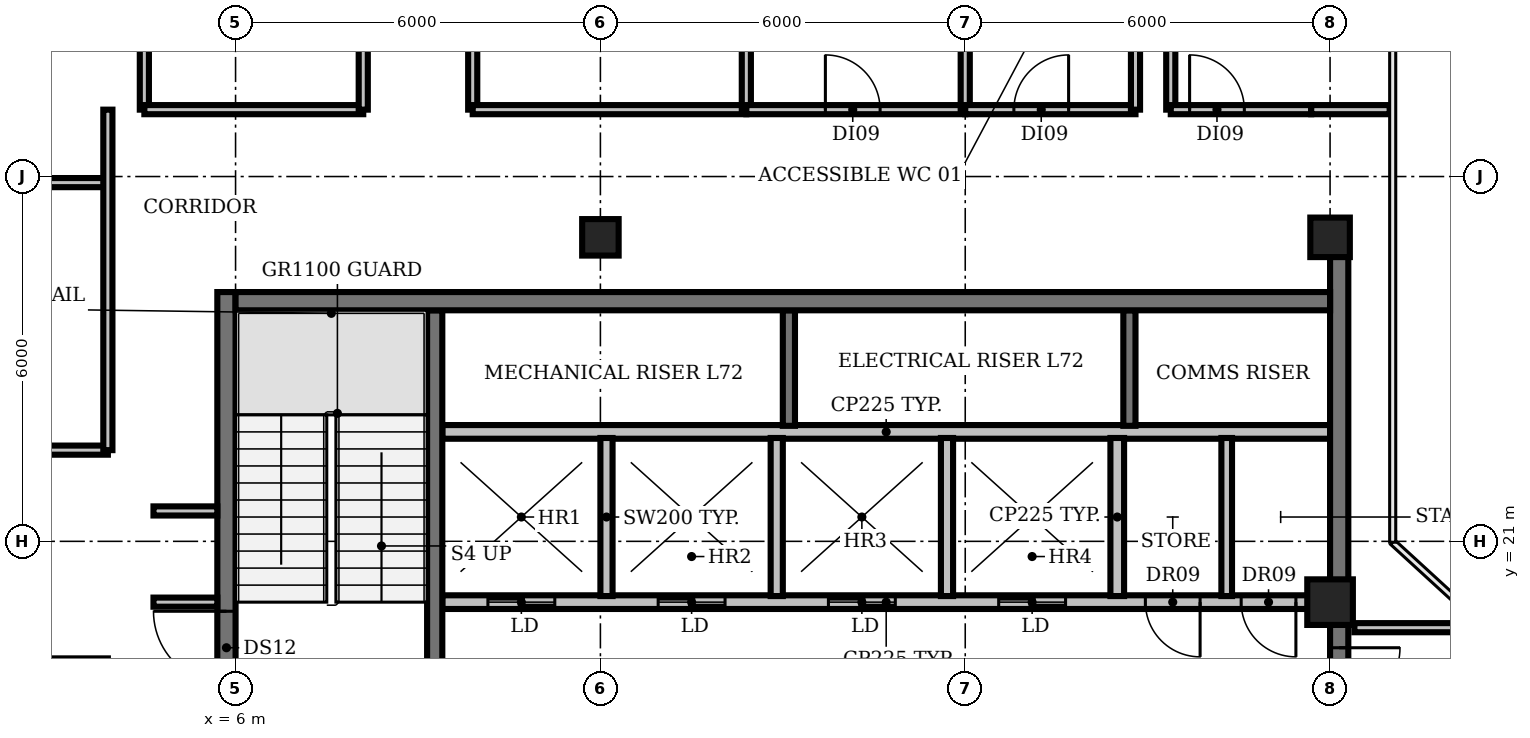
"""IFC4 building model, lengths in metres.
Left out: names, types, materials, properties, quantities, classifications, styles, units other than length and angle.
Written with IfcOpenShell. Run it as: python <this file> out.ifc"""

import sys

from ifc_helpers import new_model, si_unit, direction, frame, frame_2d, origin, origin_2d, place, context, subcontext, project, spatial, rectangle, circle, extrude, element, fill, save


model = new_model("IFC4")
c1 = context("Model", 3, precision=1e-05, world=origin(), true_north=direction((0.0, 1.0)))
c2 = subcontext(c1, "Body", "Model", "MODEL_VIEW")
j1 = project(units=[si_unit("LENGTHUNIT", "METRE"), si_unit("PLANEANGLEUNIT", "RADIAN")], contexts=[c1])
p1 = place(None, origin())
s1 = spatial("IfcSite", under=j1, at=p1, CompositionType="ELEMENT")
p2 = place(p1, origin())
s2 = spatial("IfcBuilding", under=s1, at=p2, CompositionType="ELEMENT")
p3 = place(p2, frame((0.0, 0.0, 323.0)))
s3 = spatial("IfcBuildingStorey", under=s2, at=p3, CompositionType="ELEMENT", Elevation=323.0)
p4 = place(p3, frame((12.0, 26.0, 0.0), z_axis=(0.0, 0.0, 1.0), x_axis=(1.0, 0.0, 0.0)))
e1 = element("IfcColumn", 1, at=p4, inside=s3, PredefinedType="COLUMN", context=c2, shape_type="SweptSolid", body=[
    extrude(rectangle(XDim=0.6, YDim=0.6, at=origin_2d()), origin(), (0.0, 0.0, 1.0), 3.9),
])
p5 = place(p3, frame((24.0, 20.0, 0.0), z_axis=(0.0, 0.0, 1.0), x_axis=(1.0, 0.0, 0.0)))
e2 = element("IfcColumn", 2, at=p5, inside=s3, PredefinedType="COLUMN", context=c2, shape_type="SweptSolid", body=[
    extrude(circle(Radius=0.375, at=origin_2d()), origin(), (0.0, 0.0, 1.0), 3.9),
])
p6 = place(p3, frame((24.0, 26.0, 0.0), z_axis=(0.0, 0.0, 1.0), x_axis=(1.0, 0.0, 0.0)))
e3 = element("IfcColumn", 3, at=p6, inside=s3, PredefinedType="COLUMN", context=c2, shape_type="SweptSolid", body=[
    extrude(rectangle(XDim=0.65, YDim=0.65, at=origin_2d()), origin(), (0.0, 0.0, 1.0), 3.9),
])
p7 = place(p3, frame((24.0, 20.0, 0.0), z_axis=(0.0, 0.0, 1.0), x_axis=(-1.0, 0.0, 0.0)))
e4 = element("IfcWall", 4, at=p7, inside=s3, PredefinedType="PARTITIONING", context=c2, shape_type="SweptSolid", body=[
    extrude(rectangle(XDim=14.6, YDim=0.225, at=frame_2d((7.3, 0.0))), origin(), (0.0, 0.0, 1.0), 3.9),
])
p8 = place(p7, frame((12.75, 0.0, 0.0)))
e5 = element("IfcOpeningElement", 5, at=p8, cuts=e4, PredefinedType="OPENING", context=c2, shape_type="SweptSolid", body=[
    extrude(rectangle(XDim=1.1, YDim=2.1, at=frame_2d((0.55, 1.05))), frame((0.0, 0.123, 0.0), z_axis=(0.0, -1.0, 0.0), x_axis=(1.0, 0.0, 0.0)), (0.0, 0.0, 1.0), 0.245),
])
p9 = place(p7, frame((9.95, 0.0, 0.0)))
e6 = element("IfcOpeningElement", 6, at=p9, cuts=e4, PredefinedType="OPENING", context=c2, shape_type="SweptSolid", body=[
    extrude(rectangle(XDim=1.1, YDim=2.1, at=frame_2d((0.55, 1.05))), frame((0.0, 0.123, 0.0), z_axis=(0.0, -1.0, 0.0), x_axis=(1.0, 0.0, 0.0)), (0.0, 0.0, 1.0), 0.245),
])
p10 = place(p7, frame((7.15, 0.0, 0.0)))
e7 = element("IfcOpeningElement", 7, at=p10, cuts=e4, PredefinedType="OPENING", context=c2, shape_type="SweptSolid", body=[
    extrude(rectangle(XDim=1.1, YDim=2.1, at=frame_2d((0.55, 1.05))), frame((0.0, 0.123, 0.0), z_axis=(0.0, -1.0, 0.0), x_axis=(1.0, 0.0, 0.0)), (0.0, 0.0, 1.0), 0.245),
])
p11 = place(p7, frame((4.35, 0.0, 0.0)))
e8 = element("IfcOpeningElement", 8, at=p11, cuts=e4, PredefinedType="OPENING", context=c2, shape_type="SweptSolid", body=[
    extrude(rectangle(XDim=1.1, YDim=2.1, at=frame_2d((0.55, 1.05))), frame((0.0, 0.123, 0.0), z_axis=(0.0, -1.0, 0.0), x_axis=(1.0, 0.0, 0.0)), (0.0, 0.0, 1.0), 0.245),
])
p12 = place(p7, frame((2.137, 0.0, 0.0)))
e9 = element("IfcOpeningElement", 9, at=p12, cuts=e4, PredefinedType="OPENING", context=c2, shape_type="SweptSolid", body=[
    extrude(rectangle(XDim=0.9, YDim=2.1, at=frame_2d((0.45, 1.05))), frame((0.0, 0.123, 0.0), z_axis=(0.0, -1.0, 0.0), x_axis=(1.0, 0.0, 0.0)), (0.0, 0.0, 1.0), 0.245),
])
p13 = place(p7, frame((0.562, 0.0, 0.0)))
e10 = element("IfcOpeningElement", 10, at=p13, cuts=e4, PredefinedType="OPENING", context=c2, shape_type="SweptSolid", body=[
    extrude(rectangle(XDim=0.9, YDim=2.1, at=frame_2d((0.45, 1.05))), frame((0.0, 0.123, 0.0), z_axis=(0.0, -1.0, 0.0), x_axis=(1.0, 0.0, 0.0)), (0.0, 0.0, 1.0), 0.245),
])
p14 = place(p3, frame((9.4, 22.8, 0.0), z_axis=(0.0, 0.0, 1.0), x_axis=(1.0, 0.0, 0.0)))
e11 = element("IfcWall", 11, at=p14, inside=s3, PredefinedType="PARTITIONING", context=c2, shape_type="SweptSolid", body=[
    extrude(rectangle(XDim=14.6, YDim=0.225, at=frame_2d((7.3, 0.0))), origin(), (0.0, 0.0, 1.0), 3.9),
])
p15 = place(p3, frame((9.275, 18.375, 0.0), z_axis=(0.0, 0.0, 1.0), x_axis=(0.0, 1.0, 0.0)))
e12 = element("IfcWall", 12, at=p15, inside=s3, PredefinedType="SHEAR", context=c2, shape_type="SweptSolid", body=[
    extrude(rectangle(XDim=6.425, YDim=0.25, at=frame_2d((3.212, 0.0))), origin(), (0.0, 0.0, 1.0), 3.9),
])
for number, where, z_axis, x_axis in (
    (13, (12.1, 20.1, 0.0), (0.0, 0.0, 1.0), (0.0, 1.0, 0.0)),
    (14, (14.9, 20.1, 0.0), (0.0, 0.0, 1.0), (0.0, 1.0, 0.0)),
):
    element("IfcWall", number, at=place(p3, frame(where, z_axis=z_axis, x_axis=x_axis)), inside=s3, PredefinedType="SOLIDWALL", context=c2, shape_type="SweptSolid", body=[
        extrude(rectangle(XDim=2.6, YDim=0.2, at=frame_2d((1.3, 0.0))), origin(), (0.0, 0.0, 1.0), 3.9),
    ])
p16 = place(p3, frame((15.1, 22.9, 0.0), z_axis=(0.0, 0.0, 1.0), x_axis=(0.0, 1.0, 0.0)))
e15 = element("IfcWall", 15, at=p16, inside=s3, PredefinedType="SHEAR", context=c2, shape_type="SweptSolid", body=[
    extrude(rectangle(XDim=1.9, YDim=0.2, at=frame_2d((0.95, 0.0))), origin(), (0.0, 0.0, 1.0), 3.9),
])
p17 = place(p3, frame((17.7, 20.1, 0.0), z_axis=(0.0, 0.0, 1.0), x_axis=(0.0, 1.0, 0.0)))
e16 = element("IfcWall", 16, at=p17, inside=s3, PredefinedType="SOLIDWALL", context=c2, shape_type="SweptSolid", body=[
    extrude(rectangle(XDim=2.6, YDim=0.2, at=frame_2d((1.3, 0.0))), origin(), (0.0, 0.0, 1.0), 3.9),
])
p18 = place(p3, frame((20.5, 20.1, 0.0), z_axis=(0.0, 0.0, 1.0), x_axis=(0.0, 1.0, 0.0)))
e17 = element("IfcWall", 17, at=p18, inside=s3, PredefinedType="PARTITIONING", context=c2, shape_type="SweptSolid", body=[
    extrude(rectangle(XDim=2.6, YDim=0.225, at=frame_2d((1.3, 0.0))), origin(), (0.0, 0.0, 1.0), 3.9),
])
p19 = place(p3, frame((20.7, 22.9, 0.0), z_axis=(0.0, 0.0, 1.0), x_axis=(0.0, 1.0, 0.0)))
e18 = element("IfcWall", 18, at=p19, inside=s3, PredefinedType="SHEAR", context=c2, shape_type="SweptSolid", body=[
    extrude(rectangle(XDim=1.9, YDim=0.2, at=frame_2d((0.95, 0.0))), origin(), (0.0, 0.0, 1.0), 3.9),
])
p20 = place(p3, frame((22.3, 20.1, 0.0), z_axis=(0.0, 0.0, 1.0), x_axis=(0.0, 1.0, 0.0)))
e19 = element("IfcWall", 19, at=p20, inside=s3, PredefinedType="PARTITIONING", context=c2, shape_type="SweptSolid", body=[
    extrude(rectangle(XDim=2.6, YDim=0.175, at=frame_2d((1.3, 0.0))), origin(), (0.0, 0.0, 1.0), 3.9),
])
p21 = place(p3, frame((5.85, 5.1, 0.0), z_axis=(0.0, 0.0, 1.0), x_axis=(0.0, 1.0, 0.0)))
e20 = element("IfcWall", 20, at=p21, inside=s3, PredefinedType="SHEAR", context=c2, shape_type="SweptSolid", body=[
    extrude(rectangle(XDim=20.0, YDim=0.3, at=frame_2d((10.0, 0.0))), origin(), (0.0, 0.0, 1.0), 3.9),
])
p22 = place(p21, frame((0.55, 0.0, 0.0)))
e21 = element("IfcOpeningElement", 21, at=p22, cuts=e20, PredefinedType="OPENING", context=c2, shape_type="SweptSolid", body=[
    extrude(rectangle(XDim=1.5, YDim=2.1, at=frame_2d((0.75, 1.05))), frame((0.0, 0.16, 0.0), z_axis=(0.0, -1.0, 0.0), x_axis=(1.0, 0.0, 0.0)), (0.0, 0.0, 1.0), 0.32),
])
p23 = place(p21, frame((7.0, 0.0, 0.0)))
e22 = element("IfcOpeningElement", 22, at=p23, cuts=e20, PredefinedType="OPENING", context=c2, shape_type="SweptSolid", body=[
    extrude(rectangle(XDim=1.2, YDim=2.1, at=frame_2d((0.6, 1.05))), frame((0.0, 0.16, 0.0), z_axis=(0.0, -1.0, 0.0), x_axis=(1.0, 0.0, 0.0)), (0.0, 0.0, 1.0), 0.32),
])
p24 = place(p21, frame((13.55, 0.0, 0.0)))
e23 = element("IfcOpeningElement", 23, at=p24, cuts=e20, PredefinedType="OPENING", context=c2, shape_type="SweptSolid", body=[
    extrude(rectangle(XDim=1.2, YDim=2.1, at=frame_2d((0.6, 1.05))), frame((0.0, 0.16, 0.0), z_axis=(0.0, -1.0, 0.0), x_axis=(1.0, 0.0, 0.0)), (0.0, 0.0, 1.0), 0.32),
])
p25 = place(p3, frame((24.15, 25.705, 0.0), z_axis=(0.0, 0.0, 1.0), x_axis=(0.0, -1.0, 0.0)))
e24 = element("IfcWall", 24, at=p25, inside=s3, PredefinedType="SHEAR", context=c2, shape_type="SweptSolid", body=[
    extrude(rectangle(XDim=20.605, YDim=0.3, at=frame_2d((10.302, 0.0))), origin(), (0.0, 0.0, 1.0), 3.9),
])
p26 = place(p25, frame((18.555, 0.0, 0.0)))
e25 = element("IfcOpeningElement", 25, at=p26, cuts=e24, PredefinedType="OPENING", context=c2, shape_type="SweptSolid", body=[
    extrude(rectangle(XDim=1.5, YDim=2.1, at=frame_2d((0.75, 1.05))), frame((0.0, 0.16, 0.0), z_axis=(0.0, -1.0, 0.0), x_axis=(1.0, 0.0, 0.0)), (0.0, 0.0, 1.0), 0.32),
])
p27 = place(p25, frame((12.455, 0.0, 0.0)))
e26 = element("IfcOpeningElement", 26, at=p27, cuts=e24, PredefinedType="OPENING", context=c2, shape_type="SweptSolid", body=[
    extrude(rectangle(XDim=0.9, YDim=2.1, at=frame_2d((0.45, 1.05))), frame((0.0, 0.16, 0.0), z_axis=(0.0, -1.0, 0.0), x_axis=(1.0, 0.0, 0.0)), (0.0, 0.0, 1.0), 0.32),
])
p28 = place(p25, frame((6.455, 0.0, 0.0)))
e27 = element("IfcOpeningElement", 27, at=p28, cuts=e24, PredefinedType="OPENING", context=c2, shape_type="SweptSolid", body=[
    extrude(rectangle(XDim=2.0, YDim=2.1, at=frame_2d((1.0, 1.05))), frame((0.0, 0.16, 0.0), z_axis=(0.0, -1.0, 0.0), x_axis=(1.0, 0.0, 0.0)), (0.0, 0.0, 1.0), 0.32),
])
p29 = place(p3, frame((6.0, 24.95, 0.0), z_axis=(0.0, 0.0, 1.0), x_axis=(1.0, 0.0, 0.0)))
e28 = element("IfcWall", 28, at=p29, inside=s3, PredefinedType="SHEAR", context=c2, shape_type="SweptSolid", body=[
    extrude(rectangle(XDim=18.0, YDim=0.3, at=frame_2d((9.0, 0.0))), origin(), (0.0, 0.0, 1.0), 3.9),
])
p30 = place(p3, frame((-1.18, 26.9, 0.0), z_axis=(0.0, 0.0, 1.0), x_axis=(1.0, 0.0, 0.0)))
e29 = element("IfcWall", 29, at=p30, inside=s3, PredefinedType="PARTITIONING", context=c2, shape_type="SweptSolid", body=[
    extrude(rectangle(XDim=5.08, YDim=0.15, at=frame_2d((2.54, 0.0))), origin(), (0.0, 0.0, 1.0), 2.48),
])
p31 = place(p3, frame((2.79, 22.5, 0.0), z_axis=(0.0, 0.0, 1.0), x_axis=(1.0, 0.0, 0.0)))
e30 = element("IfcWall", 30, at=p31, inside=s3, PredefinedType="PARTITIONING", context=c2, shape_type="SweptSolid", body=[
    extrude(rectangle(XDim=1.11, YDim=0.15, at=frame_2d((0.555, 0.0))), origin(), (0.0, 0.0, 1.0), 2.48),
])
p32 = place(p3, frame((3.9, 22.5, 0.0), z_axis=(0.0, 0.0, 1.0), x_axis=(0.0, 1.0, 0.0)))
e31 = element("IfcWall", 31, at=p32, inside=s3, PredefinedType="PARTITIONING", context=c2, shape_type="SweptSolid", body=[
    extrude(rectangle(XDim=5.6, YDim=0.15, at=frame_2d((2.8, 0.0))), origin(), (0.0, 0.0, 1.0), 2.48),
])
p33 = place(p3, frame((4.5, 28.1, 0.0), z_axis=(0.0, 0.0, 1.0), x_axis=(0.0, 1.0, 0.0)))
e32 = element("IfcWall", 32, at=p33, inside=s3, PredefinedType="PARTITIONING", context=c2, shape_type="SweptSolid", body=[
    extrude(rectangle(XDim=4.8, YDim=0.15, at=frame_2d((2.4, 0.0))), origin(), (0.0, 0.0, 1.0), 2.48),
])
p34 = place(p3, frame((4.5, 28.1, 0.0), z_axis=(0.0, 0.0, 1.0), x_axis=(1.0, 0.0, 0.0)))
e33 = element("IfcWall", 33, at=p34, inside=s3, PredefinedType="PARTITIONING", context=c2, shape_type="SweptSolid", body=[
    extrude(rectangle(XDim=3.6, YDim=0.15, at=frame_2d((1.8, 0.0))), origin(), (0.0, 0.0, 1.0), 2.48),
])
for number, where, z_axis, x_axis in (
    (34, (4.65, 20.0, 0.0), (0.0, 0.0, 1.0), (1.0, 0.0, 0.0)),
    (35, (4.65, 21.5, 0.0), (0.0, 0.0, 1.0), (1.0, 0.0, 0.0)),
):
    element("IfcWall", number, at=place(p3, frame(where, z_axis=z_axis, x_axis=x_axis)), inside=s3, PredefinedType="PARTITIONING", context=c2, shape_type="SweptSolid", body=[
        extrude(rectangle(XDim=1.05, YDim=0.15, at=frame_2d((0.525, 0.0))), origin(), (0.0, 0.0, 1.0), 2.48),
    ])
p35 = place(p3, frame((8.1, 28.1, 0.0), z_axis=(0.0, 0.0, 1.0), x_axis=(0.0, 1.0, 0.0)))
e36 = element("IfcWall", 36, at=p35, inside=s3, PredefinedType="PARTITIONING", context=c2, shape_type="SweptSolid", body=[
    extrude(rectangle(XDim=4.8, YDim=0.15, at=frame_2d((2.4, 0.0))), origin(), (0.0, 0.0, 1.0), 2.48),
])
p36 = place(p35, frame((1.3, 0.0, 0.0)))
e37 = element("IfcOpeningElement", 37, at=p36, cuts=e36, PredefinedType="OPENING", context=c2, shape_type="SweptSolid", body=[
    extrude(rectangle(XDim=0.9, YDim=2.1, at=frame_2d((0.45, 1.05))), frame((0.0, 0.085, 0.0), z_axis=(0.0, -1.0, 0.0), x_axis=(1.0, 0.0, 0.0)), (0.0, 0.0, 1.0), 0.17),
])
p37 = place(p3, frame((9.9, 28.1, 0.0), z_axis=(0.0, 0.0, 1.0), x_axis=(0.0, 1.0, 0.0)))
e38 = element("IfcWall", 38, at=p37, inside=s3, PredefinedType="PARTITIONING", context=c2, shape_type="SweptSolid", body=[
    extrude(rectangle(XDim=4.8, YDim=0.15, at=frame_2d((2.4, 0.0))), origin(), (0.0, 0.0, 1.0), 2.48),
])
p38 = place(p3, frame((9.9, 28.1, 0.0), z_axis=(0.0, 0.0, 1.0), x_axis=(1.0, 0.0, 0.0)))
e39 = element("IfcWall", 39, at=p38, inside=s3, PredefinedType="PARTITIONING", context=c2, shape_type="SweptSolid", body=[
    extrude(rectangle(XDim=4.5, YDim=0.15, at=frame_2d((2.25, 0.0))), origin(), (0.0, 0.0, 1.0), 2.48),
])
p39 = place(p3, frame((14.4, 28.1, 0.0), z_axis=(0.0, 0.0, 1.0), x_axis=(0.0, 1.0, 0.0)))
e40 = element("IfcWall", 40, at=p39, inside=s3, PredefinedType="PARTITIONING", context=c2, shape_type="SweptSolid", body=[
    extrude(rectangle(XDim=4.8, YDim=0.15, at=frame_2d((2.4, 0.0))), origin(), (0.0, 0.0, 1.0), 2.48),
])
p40 = place(p3, frame((14.4, 28.1, 0.0), z_axis=(0.0, 0.0, 1.0), x_axis=(1.0, 0.0, 0.0)))
e41 = element("IfcWall", 41, at=p40, inside=s3, PredefinedType="PARTITIONING", context=c2, shape_type="SweptSolid", body=[
    extrude(rectangle(XDim=3.6, YDim=0.15, at=frame_2d((1.8, 0.0))), origin(), (0.0, 0.0, 1.0), 2.48),
])
p41 = place(p40, frame((1.3, 0.0, 0.0)))
e42 = element("IfcOpeningElement", 42, at=p41, cuts=e41, PredefinedType="OPENING", context=c2, shape_type="SweptSolid", body=[
    extrude(rectangle(XDim=0.9, YDim=2.1, at=frame_2d((0.45, 1.05))), frame((0.0, 0.085, 0.0), z_axis=(0.0, -1.0, 0.0), x_axis=(1.0, 0.0, 0.0)), (0.0, 0.0, 1.0), 0.17),
])
p42 = place(p3, frame((18.0, 28.1, 0.0), z_axis=(0.0, 0.0, 1.0), x_axis=(0.0, 1.0, 0.0)))
e43 = element("IfcWall", 43, at=p42, inside=s3, PredefinedType="PARTITIONING", context=c2, shape_type="SweptSolid", body=[
    extrude(rectangle(XDim=3.53, YDim=0.15, at=frame_2d((1.765, 0.0))), origin(), (0.0, 0.0, 1.0), 2.48),
])
p43 = place(p3, frame((18.0, 28.1, 0.0), z_axis=(0.0, 0.0, 1.0), x_axis=(1.0, 0.0, 0.0)))
e44 = element("IfcWall", 44, at=p43, inside=s3, PredefinedType="PARTITIONING", context=c2, shape_type="SweptSolid", body=[
    extrude(rectangle(XDim=2.8, YDim=0.15, at=frame_2d((1.4, 0.0))), origin(), (0.0, 0.0, 1.0), 2.48),
])
p44 = place(p43, frame((0.8, 0.0, 0.0)))
e45 = element("IfcOpeningElement", 45, at=p44, cuts=e44, PredefinedType="OPENING", context=c2, shape_type="SweptSolid", body=[
    extrude(rectangle(XDim=0.9, YDim=2.1, at=frame_2d((0.45, 1.05))), frame((0.0, 0.085, 0.0), z_axis=(0.0, -1.0, 0.0), x_axis=(1.0, 0.0, 0.0)), (0.0, 0.0, 1.0), 0.17),
])
for number, where, z_axis, x_axis in (
    (46, (20.8, 28.1, 0.0), (0.0, 0.0, 1.0), (0.0, 1.0, 0.0)),
    (47, (21.38, 28.1, 0.0), (0.0, 0.0, 1.0), (0.0, 1.0, 0.0)),
):
    element("IfcWall", number, at=place(p3, frame(where, z_axis=z_axis, x_axis=x_axis)), inside=s3, PredefinedType="PARTITIONING", context=c2, shape_type="SweptSolid", body=[
        extrude(rectangle(XDim=4.8, YDim=0.15, at=frame_2d((2.4, 0.0))), origin(), (0.0, 0.0, 1.0), 2.48),
    ])
p45 = place(p3, frame((21.38, 28.1, 0.0), z_axis=(0.0, 0.0, 1.0), x_axis=(1.0, 0.0, 0.0)))
e48 = element("IfcWall", 48, at=p45, inside=s3, PredefinedType="PARTITIONING", context=c2, shape_type="SweptSolid", body=[
    extrude(rectangle(XDim=2.31, YDim=0.15, at=frame_2d((1.155, 0.0))), origin(), (0.0, 0.0, 1.0), 2.48),
])
p46 = place(p45, frame((0.31, 0.0, 0.0)))
e49 = element("IfcOpeningElement", 49, at=p46, cuts=e48, PredefinedType="OPENING", context=c2, shape_type="SweptSolid", body=[
    extrude(rectangle(XDim=0.9, YDim=2.1, at=frame_2d((0.45, 1.05))), frame((0.0, 0.085, 0.0), z_axis=(0.0, -1.0, 0.0), x_axis=(1.0, 0.0, 0.0)), (0.0, 0.0, 1.0), 0.17),
])
p47 = place(p3, frame((23.69, 28.1, 0.0), z_axis=(0.0, 0.0, 1.0), x_axis=(1.0, 0.0, 0.0)))
e50 = element("IfcWall", 50, at=p47, inside=s3, PredefinedType="PARTITIONING", context=c2, shape_type="SweptSolid", body=[
    extrude(rectangle(XDim=1.29, YDim=0.15, at=frame_2d((0.645, 0.0))), origin(), (0.0, 0.0, 1.0), 2.48),
])
p48 = place(p3, frame((24.4, 19.58, 0.0), z_axis=(0.0, 0.0, 1.0), x_axis=(1.0, 0.0, 0.0)))
e51 = element("IfcWall", 51, at=p48, inside=s3, PredefinedType="PARTITIONING", context=c2, shape_type="SweptSolid", body=[
    extrude(rectangle(XDim=2.075, YDim=0.15, at=frame_2d((1.038, 0.0))), origin(), (0.0, 0.0, 1.0), 2.48),
])
p49 = place(p8, origin())
e52 = element("IfcDoor", 52, at=p49, inside=s3, OperationType="DOUBLE_DOOR_SLIDING", PredefinedType="DOOR", context=c2, shape_type="SweptSolid", body=[
    extrude(rectangle(XDim=1.1, YDim=2.1, at=frame_2d((0.55, 1.05))), frame((0.0, 0.025, 0.0), z_axis=(0.0, -1.0, 0.0), x_axis=(1.0, 0.0, 0.0)), (0.0, 0.0, 1.0), 0.05),
])
fill(e5, e52)
p50 = place(p9, origin())
e53 = element("IfcDoor", 53, at=p50, inside=s3, OperationType="DOUBLE_DOOR_SLIDING", PredefinedType="DOOR", context=c2, shape_type="SweptSolid", body=[
    extrude(rectangle(XDim=1.1, YDim=2.1, at=frame_2d((0.55, 1.05))), frame((0.0, 0.025, 0.0), z_axis=(0.0, -1.0, 0.0), x_axis=(1.0, 0.0, 0.0)), (0.0, 0.0, 1.0), 0.05),
])
fill(e6, e53)
p51 = place(p10, origin())
e54 = element("IfcDoor", 54, at=p51, inside=s3, OperationType="DOUBLE_DOOR_SLIDING", PredefinedType="DOOR", context=c2, shape_type="SweptSolid", body=[
    extrude(rectangle(XDim=1.1, YDim=2.1, at=frame_2d((0.55, 1.05))), frame((0.0, 0.025, 0.0), z_axis=(0.0, -1.0, 0.0), x_axis=(1.0, 0.0, 0.0)), (0.0, 0.0, 1.0), 0.05),
])
fill(e7, e54)
p52 = place(p11, origin())
e55 = element("IfcDoor", 55, at=p52, inside=s3, OperationType="DOUBLE_DOOR_SLIDING", PredefinedType="DOOR", context=c2, shape_type="SweptSolid", body=[
    extrude(rectangle(XDim=1.1, YDim=2.1, at=frame_2d((0.55, 1.05))), frame((0.0, 0.025, 0.0), z_axis=(0.0, -1.0, 0.0), x_axis=(1.0, 0.0, 0.0)), (0.0, 0.0, 1.0), 0.05),
])
fill(e8, e55)
p53 = place(p12, origin())
e56 = element("IfcDoor", 56, at=p53, inside=s3, OperationType="SINGLE_SWING_LEFT", PredefinedType="DOOR", context=c2, shape_type="SweptSolid", body=[
    extrude(rectangle(XDim=0.9, YDim=2.1, at=frame_2d((0.45, 1.05))), frame((0.0, 0.025, 0.0), z_axis=(0.0, -1.0, 0.0), x_axis=(1.0, 0.0, 0.0)), (0.0, 0.0, 1.0), 0.05),
])
fill(e9, e56)
p54 = place(p13, origin())
e57 = element("IfcDoor", 57, at=p54, inside=s3, OperationType="SINGLE_SWING_LEFT", PredefinedType="DOOR", context=c2, shape_type="SweptSolid", body=[
    extrude(rectangle(XDim=0.9, YDim=2.1, at=frame_2d((0.45, 1.05))), frame((0.0, 0.025, 0.0), z_axis=(0.0, -1.0, 0.0), x_axis=(1.0, 0.0, 0.0)), (0.0, 0.0, 1.0), 0.05),
])
fill(e10, e57)
p55 = place(p24, origin())
e58 = element("IfcDoor", 58, at=p55, inside=s3, OperationType="SINGLE_SWING_RIGHT", PredefinedType="DOOR", context=c2, shape_type="SweptSolid", body=[
    extrude(rectangle(XDim=1.2, YDim=2.1, at=frame_2d((0.6, 1.05))), frame((0.0, 0.025, 0.0), z_axis=(0.0, -1.0, 0.0), x_axis=(1.0, 0.0, 0.0)), (0.0, 0.0, 1.0), 0.05),
])
fill(e23, e58)
p56 = place(p28, origin())
e59 = element("IfcDoor", 59, at=p56, inside=s3, OperationType="DOUBLE_DOOR_SINGLE_SWING", PredefinedType="DOOR", context=c2, shape_type="SweptSolid", body=[
    extrude(rectangle(XDim=2.0, YDim=2.1, at=frame_2d((1.0, 1.05))), frame((0.0, 0.025, 0.0), z_axis=(0.0, -1.0, 0.0), x_axis=(1.0, 0.0, 0.0)), (0.0, 0.0, 1.0), 0.05),
])
fill(e27, e59)
p57 = place(p41, origin())
e60 = element("IfcDoor", 60, at=p57, inside=s3, OperationType="SINGLE_SWING_LEFT", PredefinedType="DOOR", context=c2, shape_type="SweptSolid", body=[
    extrude(rectangle(XDim=0.9, YDim=2.1, at=frame_2d((0.45, 1.05))), frame((0.0, 0.025, 0.0), z_axis=(0.0, -1.0, 0.0), x_axis=(1.0, 0.0, 0.0)), (0.0, 0.0, 1.0), 0.05),
])
fill(e42, e60)
p58 = place(p44, origin())
e61 = element("IfcDoor", 61, at=p58, inside=s3, OperationType="SINGLE_SWING_RIGHT", PredefinedType="DOOR", context=c2, shape_type="SweptSolid", body=[
    extrude(rectangle(XDim=0.9, YDim=2.1, at=frame_2d((0.45, 1.05))), frame((0.0, 0.025, 0.0), z_axis=(0.0, -1.0, 0.0), x_axis=(1.0, 0.0, 0.0)), (0.0, 0.0, 1.0), 0.05),
])
fill(e45, e61)
p59 = place(p46, origin())
e62 = element("IfcDoor", 62, at=p59, inside=s3, OperationType="SINGLE_SWING_LEFT", PredefinedType="DOOR", context=c2, shape_type="SweptSolid", body=[
    extrude(rectangle(XDim=0.9, YDim=2.1, at=frame_2d((0.45, 1.05))), frame((0.0, 0.025, 0.0), z_axis=(0.0, -1.0, 0.0), x_axis=(1.0, 0.0, 0.0)), (0.0, 0.0, 1.0), 0.05),
])
fill(e49, e62)
save(model, sys.argv[1])
